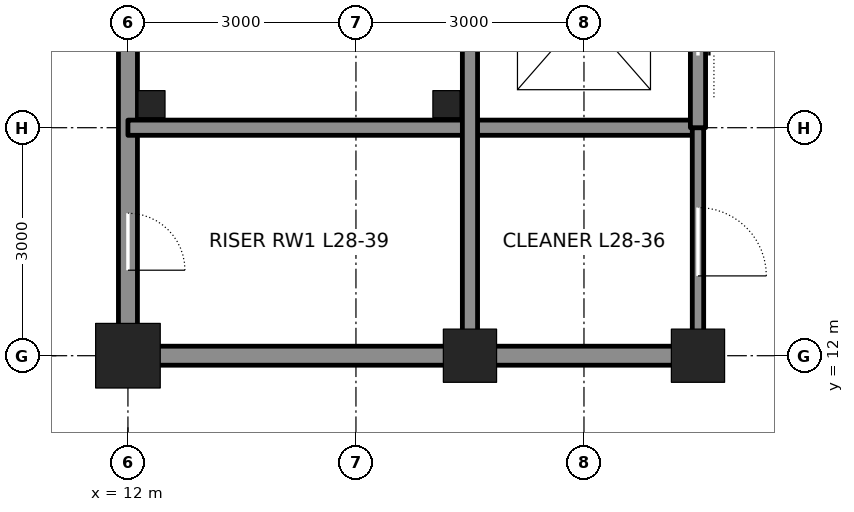
"""IFC4 building model, lengths in metres.
Left out: names, types, materials, properties, quantities, classifications, styles, units other than length and angle.
Written with IfcOpenShell. Run it as: python <this file> out.ifc"""

import sys

from ifc_helpers import new_model, si_unit, direction, frame, frame_2d, origin, origin_2d, place, context, subcontext, project, spatial, rectangle, hollow_rectangle, extrude, element, fill, save


model = new_model("IFC4")
c1 = context("Model", 3, precision=1e-05, world=origin(), true_north=direction((0.0, 1.0)))
c2 = subcontext(c1, "Body", "Model", "MODEL_VIEW")
j1 = project(units=[si_unit("LENGTHUNIT", "METRE"), si_unit("PLANEANGLEUNIT", "RADIAN")], contexts=[c1])
p1 = place(None, origin())
s1 = spatial("IfcSite", under=j1, at=p1, CompositionType="ELEMENT")
p2 = place(p1, origin())
s2 = spatial("IfcBuilding", under=s1, at=p2, CompositionType="ELEMENT")
p3 = place(p2, frame((0.0, 0.0, 132.0)))
s3 = spatial("IfcBuildingStorey", under=s2, at=p3, CompositionType="ELEMENT", Elevation=132.0)
p4 = place(p3, frame((12.0, 12.0, 0.0), z_axis=(0.0, 0.0, 1.0), x_axis=(1.0, 0.0, 0.0)))
e1 = element("IfcColumn", 1, at=p4, inside=s3, PredefinedType="COLUMN", context=c2, shape_type="SweptSolid", body=[
    extrude(hollow_rectangle(XDim=0.85, YDim=0.85, WallThickness=0.085, at=origin_2d()), origin(), (0.0, 0.0, 1.0), 4.2),
])
for number, where, z_axis, x_axis in (
    (2, (16.5, 12.0, 0.0), (0.0, 0.0, 1.0), (1.0, 0.0, 0.0)),
    (3, (19.5, 12.0, 0.0), (0.0, 0.0, 1.0), (1.0, 0.0, 0.0)),
):
    element("IfcColumn", number, at=place(p3, frame(where, z_axis=z_axis, x_axis=x_axis)), inside=s3, PredefinedType="COLUMN", context=c2, shape_type="SweptSolid", body=[
        extrude(hollow_rectangle(XDim=0.7, YDim=0.7, WallThickness=0.07, at=origin_2d()), origin(), (0.0, 0.0, 1.0), 4.2),
    ])
p5 = place(p3, frame((12.0, 12.25, 0.0), z_axis=(0.0, 0.0, 1.0), x_axis=(0.0, 1.0, 0.0)))
e4 = element("IfcWall", 4, at=p5, inside=s3, PredefinedType="SOLIDWALL", context=c2, shape_type="SweptSolid", body=[
    extrude(rectangle(XDim=8.5, YDim=0.25, at=frame_2d((4.25, 0.0))), origin(), (0.0, 0.0, 1.0), 3.113),
])
p6 = place(p5, frame((0.875, 0.0, 0.0)))
e5 = element("IfcOpeningElement", 5, at=p6, cuts=e4, PredefinedType="OPENING", context=c2, shape_type="SweptSolid", body=[
    extrude(rectangle(XDim=0.75, YDim=2.1, at=frame_2d((0.375, 1.05))), frame((0.0, 0.135, 0.0), z_axis=(0.0, -1.0, 0.0), x_axis=(1.0, 0.0, 0.0)), (0.0, 0.0, 1.0), 0.27),
])
p7 = place(p3, frame((12.25, 12.0, 0.0), z_axis=(0.0, 0.0, 1.0), x_axis=(1.0, 0.0, 0.0)))
e6 = element("IfcWall", 6, at=p7, inside=s3, PredefinedType="SOLIDWALL", context=c2, shape_type="SweptSolid", body=[
    extrude(rectangle(XDim=4.0, YDim=0.25, at=frame_2d((2.0, 0.0))), origin(), (0.0, 0.0, 1.0), 3.181),
])
p8 = place(p3, frame((16.75, 12.0, 0.0), z_axis=(0.0, 0.0, 1.0), x_axis=(1.0, 0.0, 0.0)))
e7 = element("IfcWall", 7, at=p8, inside=s3, PredefinedType="SOLIDWALL", context=c2, shape_type="SweptSolid", body=[
    extrude(rectangle(XDim=2.5, YDim=0.25, at=frame_2d((1.25, 0.0))), origin(), (0.0, 0.0, 1.0), 3.181),
])
p9 = place(p3, frame((12.0, 15.0, 0.0), z_axis=(0.0, 0.0, 1.0), x_axis=(1.0, 0.0, 0.0)))
e8 = element("IfcWall", 8, at=p9, inside=s3, PredefinedType="SOLIDWALL", context=c2, shape_type="SweptSolid", body=[
    extrude(rectangle(XDim=7.5, YDim=0.2, at=frame_2d((3.75, 0.0))), origin(), (0.0, 0.0, 1.0), 4.04),
])
p10 = place(p3, frame((16.5, 12.25, 0.0), z_axis=(0.0, 0.0, 1.0), x_axis=(0.0, 1.0, 0.0)))
e9 = element("IfcWall", 9, at=p10, inside=s3, PredefinedType="SOLIDWALL", context=c2, shape_type="SweptSolid", body=[
    extrude(rectangle(XDim=8.5, YDim=0.2, at=frame_2d((4.25, 0.0))), origin(), (0.0, 0.0, 1.0), 3.113),
])
p11 = place(p3, frame((19.5, 12.25, 0.0), z_axis=(0.0, 0.0, 1.0), x_axis=(0.0, 1.0, 0.0)))
e10 = element("IfcWall", 10, at=p11, inside=s3, PredefinedType="PARTITIONING", context=c2, shape_type="SweptSolid", body=[
    extrude(rectangle(XDim=2.75, YDim=0.15, at=frame_2d((1.375, 0.0))), origin(), (0.0, 0.0, 1.0), 3.065),
])
p12 = place(p11, frame((0.8, 0.0, 0.0)))
e11 = element("IfcOpeningElement", 11, at=p12, cuts=e10, PredefinedType="OPENING", context=c2, shape_type="SweptSolid", body=[
    extrude(rectangle(XDim=0.9, YDim=2.1, at=frame_2d((0.45, 1.05))), frame((0.0, 0.085, 0.0), z_axis=(0.0, -1.0, 0.0), x_axis=(1.0, 0.0, 0.0)), (0.0, 0.0, 1.0), 0.17),
])
p13 = place(p3, frame((19.5, 15.0, 0.0), z_axis=(0.0, 0.0, 1.0), x_axis=(0.0, 1.0, 0.0)))
e12 = element("IfcWall", 12, at=p13, inside=s3, PredefinedType="SOLIDWALL", context=c2, shape_type="SweptSolid", body=[
    extrude(rectangle(XDim=12.0, YDim=0.2, at=frame_2d((6.0, 0.0))), origin(), (0.0, 0.0, 1.0), 3.065),
])
p14 = place(p13, frame((0.95, 0.0, 0.0)))
e13 = element("IfcOpeningElement", 13, at=p14, cuts=e12, PredefinedType="OPENING", context=c2, shape_type="SweptSolid", body=[
    extrude(rectangle(XDim=1.1, YDim=2.1, at=frame_2d((0.55, 1.05))), frame((0.0, 0.11, 0.0), z_axis=(0.0, -1.0, 0.0), x_axis=(1.0, 0.0, 0.0)), (0.0, 0.0, 1.0), 0.22),
])
p15 = place(p13, frame((3.95, 0.0, 0.0)))
e14 = element("IfcOpeningElement", 14, at=p15, cuts=e12, PredefinedType="OPENING", context=c2, shape_type="SweptSolid", body=[
    extrude(rectangle(XDim=1.1, YDim=2.1, at=frame_2d((0.55, 1.05))), frame((0.0, 0.11, 0.0), z_axis=(0.0, -1.0, 0.0), x_axis=(1.0, 0.0, 0.0)), (0.0, 0.0, 1.0), 0.22),
])
p16 = place(p13, frame((6.95, 0.0, 0.0)))
e15 = element("IfcOpeningElement", 15, at=p16, cuts=e12, PredefinedType="OPENING", context=c2, shape_type="SweptSolid", body=[
    extrude(rectangle(XDim=1.1, YDim=2.1, at=frame_2d((0.55, 1.05))), frame((0.0, 0.11, 0.0), z_axis=(0.0, -1.0, 0.0), x_axis=(1.0, 0.0, 0.0)), (0.0, 0.0, 1.0), 0.22),
])
p17 = place(p13, frame((9.95, 0.0, 0.0)))
e16 = element("IfcOpeningElement", 16, at=p17, cuts=e12, PredefinedType="OPENING", context=c2, shape_type="SweptSolid", body=[
    extrude(rectangle(XDim=1.1, YDim=2.1, at=frame_2d((0.55, 1.05))), frame((0.0, 0.11, 0.0), z_axis=(0.0, -1.0, 0.0), x_axis=(1.0, 0.0, 0.0)), (0.0, 0.0, 1.0), 0.22),
])
for number, where, z_axis, x_axis in (
    (17, (12.31, 15.31, 0.0), (0.0, 0.0, 1.0), (1.0, 0.0, 0.0)),
    (18, (16.19, 15.31, 0.0), (0.0, 0.0, 1.0), (1.0, 0.0, 0.0)),
):
    element("IfcColumn", number, at=place(p3, frame(where, z_axis=z_axis, x_axis=x_axis)), inside=s3, PredefinedType="COLUMN", context=c2, shape_type="SweptSolid", body=[
        extrude(hollow_rectangle(XDim=0.356, YDim=0.356, WallThickness=0.015, at=origin_2d()), origin(), (0.0, 0.0, 1.0), 4.2),
    ])
p18 = place(p6, frame((0.75, 0.0, 0.0), z_axis=(0.0, 0.0, 1.0), x_axis=(-1.0, 0.0, 0.0)))
e19 = element("IfcDoor", 19, at=p18, inside=s3, OperationType="SINGLE_SWING_RIGHT", PredefinedType="DOOR", context=c2, shape_type="SweptSolid", body=[
    extrude(rectangle(XDim=0.75, YDim=2.1, at=frame_2d((0.375, 1.05))), frame((0.0, 0.025, 0.0), z_axis=(0.0, -1.0, 0.0), x_axis=(1.0, 0.0, 0.0)), (0.0, 0.0, 1.0), 0.05),
])
fill(e5, e19)
p19 = place(p12, frame((0.9, 0.0, 0.0), z_axis=(0.0, 0.0, 1.0), x_axis=(-1.0, 0.0, 0.0)))
e20 = element("IfcDoor", 20, at=p19, inside=s3, OperationType="SINGLE_SWING_RIGHT", PredefinedType="DOOR", context=c2, shape_type="SweptSolid", body=[
    extrude(rectangle(XDim=0.9, YDim=2.1, at=frame_2d((0.45, 1.05))), frame((0.0, 0.025, 0.0), z_axis=(0.0, -1.0, 0.0), x_axis=(1.0, 0.0, 0.0)), (0.0, 0.0, 1.0), 0.05),
])
fill(e11, e20)
p20 = place(p14, origin())
e21 = element("IfcDoor", 21, at=p20, inside=s3, OperationType="DOUBLE_DOOR_SLIDING", PredefinedType="DOOR", context=c2, shape_type="SweptSolid", body=[
    extrude(rectangle(XDim=1.1, YDim=2.1, at=frame_2d((0.55, 1.05))), frame((0.0, 0.025, 0.0), z_axis=(0.0, -1.0, 0.0), x_axis=(1.0, 0.0, 0.0)), (0.0, 0.0, 1.0), 0.05),
])
fill(e13, e21)
save(model, sys.argv[1])
